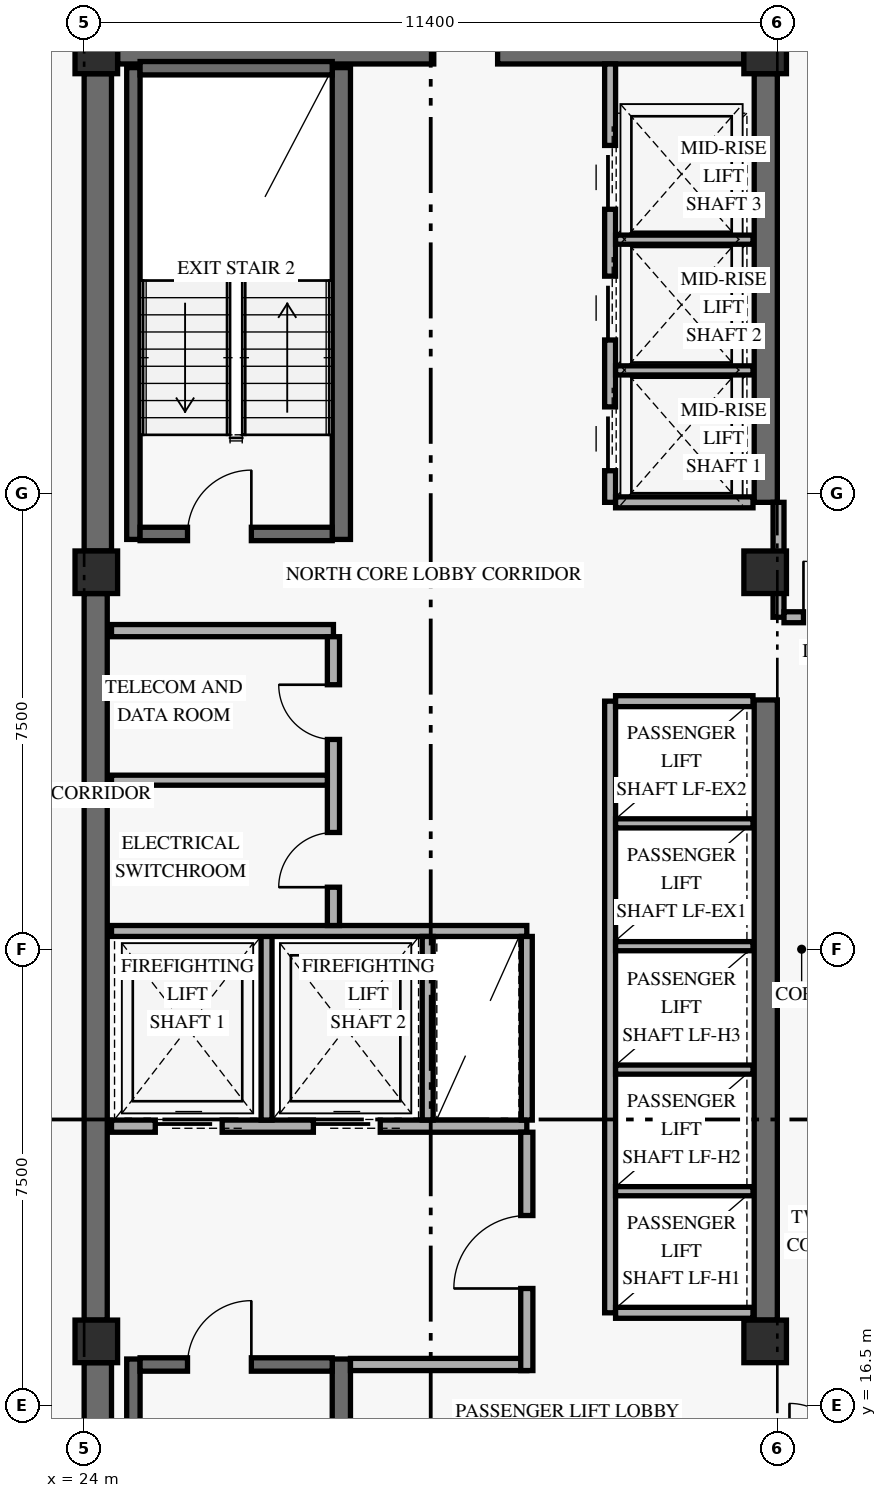
"""IFC4 building model, lengths in metres.
Left out: names, types, materials, properties, quantities, classifications, styles, units other than length and angle.
Written with IfcOpenShell. Run it as: python <this file> out.ifc"""

import sys

from ifc_helpers import new_model, si_unit, direction, frame, frame_2d, origin, origin_2d, place, context, subcontext, project, spatial, rectangle, extrude, element, fill, save


model = new_model("IFC4")
c1 = context("Model", 3, precision=1e-05, world=origin(), true_north=direction((0.0, 1.0)))
c2 = subcontext(c1, "Body", "Model", "MODEL_VIEW")
j1 = project(units=[si_unit("LENGTHUNIT", "METRE"), si_unit("PLANEANGLEUNIT", "RADIAN")], contexts=[c1])
p1 = place(None, origin())
s1 = spatial("IfcSite", under=j1, at=p1, CompositionType="ELEMENT")
p2 = place(p1, origin())
s2 = spatial("IfcBuilding", under=s1, at=p2, CompositionType="ELEMENT")
p3 = place(p2, frame((0.0, 0.0, 169.8)))
s3 = spatial("IfcBuildingStorey", under=s2, at=p3, CompositionType="ELEMENT", Elevation=169.8)
p4 = place(p3, frame((24.225, 9.6, 0.0), z_axis=(0.0, 0.0, 1.0), x_axis=(0.0, 1.0, 0.0)))
e1 = element("IfcWall", 1, at=p4, inside=s3, PredefinedType="SHEAR", context=c2, shape_type="SweptSolid", body=[
    extrude(rectangle(XDim=7.6, YDim=0.45, at=frame_2d((3.8, 0.0))), origin(), (0.0, 0.0, 1.0), 2.738),
])
p5 = place(p3, frame((24.19, 17.9, 0.0), z_axis=(0.0, 0.0, 1.0), x_axis=(0.0, 1.0, 0.0)))
e2 = element("IfcWall", 2, at=p5, inside=s3, PredefinedType="SHEAR", context=c2, shape_type="SweptSolid", body=[
    extrude(rectangle(XDim=11.95, YDim=0.38, at=frame_2d((5.975, 0.0))), origin(), (0.0, 0.0, 1.0), 2.738),
])
p6 = place(p3, frame((24.225, 30.55, 0.0), z_axis=(0.0, 0.0, 1.0), x_axis=(0.0, 1.0, 0.0)))
e3 = element("IfcWall", 3, at=p6, inside=s3, PredefinedType="SHEAR", context=c2, shape_type="SweptSolid", body=[
    extrude(rectangle(XDim=7.85, YDim=0.45, at=frame_2d((3.925, 0.0))), origin(), (0.0, 0.0, 1.0), 2.738),
])
p7 = place(p3, frame((35.21, 17.9, 0.0), z_axis=(0.0, 0.0, 1.0), x_axis=(0.0, 1.0, 0.0)))
e4 = element("IfcWall", 4, at=p7, inside=s3, PredefinedType="SHEAR", context=c2, shape_type="SweptSolid", body=[
    extrude(rectangle(XDim=10.2, YDim=0.38, at=frame_2d((5.1, 0.0))), origin(), (0.0, 0.0, 1.0), 2.738),
])
p8 = place(p3, frame((35.21, 31.35, 0.0), z_axis=(0.0, 0.0, 1.0), x_axis=(0.0, 1.0, 0.0)))
e5 = element("IfcWall", 5, at=p8, inside=s3, PredefinedType="SHEAR", context=c2, shape_type="SweptSolid", body=[
    extrude(rectangle(XDim=7.05, YDim=0.38, at=frame_2d((3.525, 0.0))), origin(), (0.0, 0.0, 1.0), 2.738),
])
p9 = place(p3, frame((24.55, 38.75, 0.0), z_axis=(0.0, 0.0, 1.0), x_axis=(1.0, 0.0, 0.0)))
e6 = element("IfcWall", 6, at=p9, inside=s3, PredefinedType="SHEAR", context=c2, shape_type="SweptSolid", body=[
    extrude(rectangle(XDim=10.3, YDim=0.38, at=frame_2d((5.15, 0.0))), origin(), (0.0, 0.0, 1.0), 3.35),
])
p10 = place(p9, frame((5.2, 0.0, 0.0)))
e7 = element("IfcOpeningElement", 7, at=p10, cuts=e6, PredefinedType="OPENING", context=c2, shape_type="SweptSolid", body=[
    extrude(rectangle(XDim=1.05, YDim=2.15, at=frame_2d((0.525, 1.075))), frame((0.0, 0.2, 0.0), z_axis=(0.0, -1.0, 0.0), x_axis=(1.0, 0.0, 0.0)), (0.0, 0.0, 1.0), 0.4),
])
p11 = place(p3, frame((24.81, 9.5, 0.0), z_axis=(0.0, 0.0, 1.0), x_axis=(0.0, 1.0, 0.0)))
e8 = element("IfcWall", 8, at=p11, inside=s3, PredefinedType="SHEAR", context=c2, shape_type="SweptSolid", body=[
    extrude(rectangle(XDim=7.76, YDim=0.22, at=frame_2d((3.88, 0.0))), origin(), (0.0, 0.0, 1.0), 3.35),
])
p12 = place(p3, frame((28.23, 9.5, 0.0), z_axis=(0.0, 0.0, 1.0), x_axis=(0.0, 1.0, 0.0)))
e9 = element("IfcWall", 9, at=p12, inside=s3, PredefinedType="SHEAR", context=c2, shape_type="SweptSolid", body=[
    extrude(rectangle(XDim=7.76, YDim=0.3, at=frame_2d((3.88, 0.0))), origin(), (0.0, 0.0, 1.0), 3.35),
])
p13 = place(p3, frame((24.92, 17.17, 0.0), z_axis=(0.0, 0.0, 1.0), x_axis=(1.0, 0.0, 0.0)))
e10 = element("IfcWall", 10, at=p13, inside=s3, PredefinedType="SHEAR", context=c2, shape_type="SweptSolid", body=[
    extrude(rectangle(XDim=3.16, YDim=0.22, at=frame_2d((1.58, 0.0))), origin(), (0.0, 0.0, 1.0), 3.35),
])
p14 = place(p13, frame((0.78, 0.0, 0.0)))
e11 = element("IfcOpeningElement", 11, at=p14, cuts=e10, PredefinedType="OPENING", context=c2, shape_type="SweptSolid", body=[
    extrude(rectangle(XDim=1.05, YDim=2.15, at=frame_2d((0.525, 1.075))), frame((0.0, 0.12, 0.0), z_axis=(0.0, -1.0, 0.0), x_axis=(1.0, 0.0, 0.0)), (0.0, 0.0, 1.0), 0.24),
])
p15 = place(p3, frame((24.81, 30.74, 0.0), z_axis=(0.0, 0.0, 1.0), x_axis=(0.0, 1.0, 0.0)))
e12 = element("IfcWall", 12, at=p15, inside=s3, PredefinedType="SHEAR", context=c2, shape_type="SweptSolid", body=[
    extrude(rectangle(XDim=7.76, YDim=0.22, at=frame_2d((3.88, 0.0))), origin(), (0.0, 0.0, 1.0), 3.35),
])
p16 = place(p3, frame((28.23, 30.74, 0.0), z_axis=(0.0, 0.0, 1.0), x_axis=(0.0, 1.0, 0.0)))
e13 = element("IfcWall", 13, at=p16, inside=s3, PredefinedType="SHEAR", context=c2, shape_type="SweptSolid", body=[
    extrude(rectangle(XDim=7.76, YDim=0.3, at=frame_2d((3.88, 0.0))), origin(), (0.0, 0.0, 1.0), 3.35),
])
p17 = place(p3, frame((24.92, 30.83, 0.0), z_axis=(0.0, 0.0, 1.0), x_axis=(1.0, 0.0, 0.0)))
e14 = element("IfcWall", 14, at=p17, inside=s3, PredefinedType="SHEAR", context=c2, shape_type="SweptSolid", body=[
    extrude(rectangle(XDim=3.16, YDim=0.22, at=frame_2d((1.58, 0.0))), origin(), (0.0, 0.0, 1.0), 3.35),
])
p18 = place(p17, frame((0.78, 0.0, 0.0)))
e15 = element("IfcOpeningElement", 15, at=p18, cuts=e14, PredefinedType="OPENING", context=c2, shape_type="SweptSolid", body=[
    extrude(rectangle(XDim=1.05, YDim=2.15, at=frame_2d((0.525, 1.075))), frame((0.0, 0.12, 0.0), z_axis=(0.0, -1.0, 0.0), x_axis=(1.0, 0.0, 0.0)), (0.0, 0.0, 1.0), 0.24),
])
p19 = place(p3, frame((24.92, 38.49, 0.0), z_axis=(0.0, 0.0, 1.0), x_axis=(1.0, 0.0, 0.0)))
e16 = element("IfcWall", 16, at=p19, inside=s3, PredefinedType="SHEAR", context=c2, shape_type="SweptSolid", body=[
    extrude(rectangle(XDim=3.16, YDim=0.22, at=frame_2d((1.58, 0.0))), origin(), (0.0, 0.0, 1.0), 3.35),
])
for number, where, z_axis, x_axis in (
    (17, (24.2, 17.55, 0.0), (0.0, 0.0, 1.0), (1.0, 0.0, 0.0)),
    (18, (24.2, 30.2, 0.0), (0.0, 0.0, 1.0), (1.0, 0.0, 0.0)),
    (19, (24.2, 38.75, 0.0), (0.0, 0.0, 1.0), (1.0, 0.0, 0.0)),
    (20, (35.2, 17.55, 0.0), (0.0, 0.0, 1.0), (1.0, 0.0, 0.0)),
    (21, (35.2, 30.2, 0.0), (0.0, 0.0, 1.0), (1.0, 0.0, 0.0)),
    (22, (35.2, 38.75, 0.0), (0.0, 0.0, 1.0), (1.0, 0.0, 0.0)),
):
    element("IfcColumn", number, at=place(p3, frame(where, z_axis=z_axis, x_axis=x_axis)), inside=s3, PredefinedType="COLUMN", context=c2, shape_type="SweptSolid", body=[
        extrude(rectangle(XDim=0.7, YDim=0.7, at=origin_2d()), origin(), (0.0, 0.0, 1.0), 3.6),
    ])
p20 = place(p3, frame((24.45, 21.09, 0.0), z_axis=(0.0, 0.0, 1.0), x_axis=(1.0, 0.0, 0.0)))
e23 = element("IfcWall", 23, at=p20, inside=s3, PredefinedType="STANDARD", context=c2, shape_type="SweptSolid", body=[
    extrude(rectangle(XDim=6.83, YDim=0.2, at=frame_2d((3.415, 0.0))), origin(), (0.0, 0.0, 1.0), 3.35),
])
p21 = place(p20, frame((0.72, 0.0, 0.0)))
e24 = element("IfcOpeningElement", 24, at=p21, cuts=e23, PredefinedType="OPENING", context=c2, shape_type="SweptSolid", body=[
    extrude(rectangle(XDim=1.1, YDim=2.2, at=frame_2d((0.55, 1.1))), frame((0.0, 0.11, 0.0), z_axis=(0.0, -1.0, 0.0), x_axis=(1.0, 0.0, 0.0)), (0.0, 0.0, 1.0), 0.22),
])
p22 = place(p20, frame((3.32, 0.0, 0.0)))
e25 = element("IfcOpeningElement", 25, at=p22, cuts=e23, PredefinedType="OPENING", context=c2, shape_type="SweptSolid", body=[
    extrude(rectangle(XDim=1.1, YDim=2.2, at=frame_2d((0.55, 1.1))), frame((0.0, 0.11, 0.0), z_axis=(0.0, -1.0, 0.0), x_axis=(1.0, 0.0, 0.0)), (0.0, 0.0, 1.0), 0.22),
])
p23 = place(p3, frame((28.38, 17.17, 0.0), z_axis=(0.0, 0.0, 1.0), x_axis=(1.0, 0.0, 0.0)))
e26 = element("IfcWall", 26, at=p23, inside=s3, PredefinedType="STANDARD", context=c2, shape_type="SweptSolid", body=[
    extrude(rectangle(XDim=2.9, YDim=0.2, at=frame_2d((1.45, 0.0))), origin(), (0.0, 0.0, 1.0), 3.35),
])
p24 = place(p3, frame((31.28, 17.07, 0.0), z_axis=(0.0, 0.0, 1.0), x_axis=(0.0, 1.0, 0.0)))
e27 = element("IfcWall", 27, at=p24, inside=s3, PredefinedType="STANDARD", context=c2, shape_type="SweptSolid", body=[
    extrude(rectangle(XDim=3.92, YDim=0.2, at=frame_2d((1.96, 0.0))), origin(), (0.0, 0.0, 1.0), 2.72),
])
p25 = place(p24, frame((1.35, 0.0, 0.0)))
e28 = element("IfcOpeningElement", 28, at=p25, cuts=e27, PredefinedType="OPENING", context=c2, shape_type="SweptSolid", body=[
    extrude(rectangle(XDim=1.2, YDim=2.15, at=frame_2d((0.6, 1.075))), frame((0.0, 0.11, 0.0), z_axis=(0.0, -1.0, 0.0), x_axis=(1.0, 0.0, 0.0)), (0.0, 0.0, 1.0), 0.22),
])
p26 = place(p3, frame((27.0, 21.19, 0.0), z_axis=(0.0, 0.0, 1.0), x_axis=(0.0, 1.0, 0.0)))
e29 = element("IfcWall", 29, at=p26, inside=s3, PredefinedType="STANDARD", context=c2, shape_type="SweptSolid", body=[
    extrude(rectangle(XDim=3.11, YDim=0.18, at=frame_2d((1.555, 0.0))), origin(), (0.0, 0.0, 1.0), 3.35),
])
p27 = place(p3, frame((24.45, 24.3, 0.0), z_axis=(0.0, 0.0, 1.0), x_axis=(1.0, 0.0, 0.0)))
e30 = element("IfcWall", 30, at=p27, inside=s3, PredefinedType="STANDARD", context=c2, shape_type="SweptSolid", body=[
    extrude(rectangle(XDim=6.83, YDim=0.18, at=frame_2d((3.415, 0.0))), origin(), (0.0, 0.0, 1.0), 3.35),
])
for number, where, z_axis, x_axis in (
    (31, (29.65, 21.19, 0.0), (0.0, 0.0, 1.0), (0.0, 1.0, 0.0)),
    (32, (31.28, 21.19, 0.0), (0.0, 0.0, 1.0), (0.0, 1.0, 0.0)),
):
    element("IfcWall", number, at=place(p3, frame(where, z_axis=z_axis, x_axis=x_axis)), inside=s3, PredefinedType="STANDARD", context=c2, shape_type="SweptSolid", body=[
        extrude(rectangle(XDim=3.02, YDim=0.18, at=frame_2d((1.51, 0.0))), origin(), (0.0, 0.0, 1.0), 3.35),
    ])
p28 = place(p3, frame((24.45, 29.24, 0.0), z_axis=(0.0, 0.0, 1.0), x_axis=(1.0, 0.0, 0.0)))
e33 = element("IfcWall", 33, at=p28, inside=s3, PredefinedType="STANDARD", context=c2, shape_type="SweptSolid", body=[
    extrude(rectangle(XDim=3.65, YDim=0.2, at=frame_2d((1.825, 0.0))), origin(), (0.0, 0.0, 1.0), 3.35),
])
p29 = place(p3, frame((28.1, 24.39, 0.0), z_axis=(0.0, 0.0, 1.0), x_axis=(0.0, 1.0, 0.0)))
e34 = element("IfcWall", 34, at=p29, inside=s3, PredefinedType="STANDARD", context=c2, shape_type="SweptSolid", body=[
    extrude(rectangle(XDim=4.75, YDim=0.2, at=frame_2d((2.375, 0.0))), origin(), (0.0, 0.0, 1.0), 3.35),
])
p30 = place(p29, frame((0.63, 0.0, 0.0)))
e35 = element("IfcOpeningElement", 35, at=p30, cuts=e34, PredefinedType="OPENING", context=c2, shape_type="SweptSolid", body=[
    extrude(rectangle(XDim=0.9, YDim=2.1, at=frame_2d((0.45, 1.05))), frame((0.0, 0.11, 0.0), z_axis=(0.0, -1.0, 0.0), x_axis=(1.0, 0.0, 0.0)), (0.0, 0.0, 1.0), 0.22),
])
p31 = place(p29, frame((3.06, 0.0, 0.0)))
e36 = element("IfcOpeningElement", 36, at=p31, cuts=e34, PredefinedType="OPENING", context=c2, shape_type="SweptSolid", body=[
    extrude(rectangle(XDim=0.9, YDim=2.1, at=frame_2d((0.45, 1.05))), frame((0.0, 0.11, 0.0), z_axis=(0.0, -1.0, 0.0), x_axis=(1.0, 0.0, 0.0)), (0.0, 0.0, 1.0), 0.22),
])
p32 = place(p3, frame((24.45, 26.78, 0.0), z_axis=(0.0, 0.0, 1.0), x_axis=(1.0, 0.0, 0.0)))
e37 = element("IfcWall", 37, at=p32, inside=s3, PredefinedType="PARTITIONING", context=c2, shape_type="SweptSolid", body=[
    extrude(rectangle(XDim=3.55, YDim=0.165, at=frame_2d((1.775, 0.0))), origin(), (0.0, 0.0, 1.0), 3.35),
])
p33 = place(p3, frame((32.65, 18.02, 0.0), z_axis=(0.0, 0.0, 1.0), x_axis=(0.0, 1.0, 0.0)))
e38 = element("IfcWall", 38, at=p33, inside=s3, PredefinedType="STANDARD", context=c2, shape_type="SweptSolid", body=[
    extrude(rectangle(XDim=10.06, YDim=0.18, at=frame_2d((5.03, 0.0))), origin(), (0.0, 0.0, 1.0), 3.35),
])
for number, where, z_axis, x_axis in (
    (39, (32.74, 18.02, 0.0), (0.0, 0.0, 1.0), (1.0, 0.0, 0.0)),
    (40, (32.74, 28.08, 0.0), (0.0, 0.0, 1.0), (1.0, 0.0, 0.0)),
):
    element("IfcWall", number, at=place(p3, frame(where, z_axis=z_axis, x_axis=x_axis)), inside=s3, PredefinedType="STANDARD", context=c2, shape_type="SweptSolid", body=[
        extrude(rectangle(XDim=2.26, YDim=0.18, at=frame_2d((1.13, 0.0))), origin(), (0.0, 0.0, 1.0), 3.35),
    ])
for number, where, z_axis, x_axis in (
    (41, (32.74, 20.02, 0.0), (0.0, 0.0, 1.0), (1.0, 0.0, 0.0)),
    (42, (32.74, 22.02, 0.0), (0.0, 0.0, 1.0), (1.0, 0.0, 0.0)),
    (43, (32.74, 24.05, 0.0), (0.0, 0.0, 1.0), (1.0, 0.0, 0.0)),
    (44, (32.74, 26.07, 0.0), (0.0, 0.0, 1.0), (1.0, 0.0, 0.0)),
):
    element("IfcWall", number, at=place(p3, frame(where, z_axis=z_axis, x_axis=x_axis)), inside=s3, PredefinedType="STANDARD", context=c2, shape_type="SweptSolid", body=[
        extrude(rectangle(XDim=2.26, YDim=0.15, at=frame_2d((1.13, 0.0))), origin(), (0.0, 0.0, 1.0), 3.35),
    ])
p34 = place(p3, frame((32.65, 31.35, 0.0), z_axis=(0.0, 0.0, 1.0), x_axis=(0.0, 1.0, 0.0)))
e45 = element("IfcWall", 45, at=p34, inside=s3, PredefinedType="STANDARD", context=c2, shape_type="SweptSolid", body=[
    extrude(rectangle(XDim=7.21, YDim=0.18, at=frame_2d((3.605, 0.0))), origin(), (0.0, 0.0, 1.0), 3.35),
])
p35 = place(p34, frame((0.52, 0.0, 0.0)))
e46 = element("IfcOpeningElement", 46, at=p35, cuts=e45, PredefinedType="OPENING", context=c2, shape_type="SweptSolid", body=[
    extrude(rectangle(XDim=1.05, YDim=2.2, at=frame_2d((0.525, 1.1))), frame((0.0, 0.1, 0.0), z_axis=(0.0, -1.0, 0.0), x_axis=(1.0, 0.0, 0.0)), (0.0, 0.0, 1.0), 0.2),
])
p36 = place(p34, frame((2.67, 0.0, 0.0)))
e47 = element("IfcOpeningElement", 47, at=p36, cuts=e45, PredefinedType="OPENING", context=c2, shape_type="SweptSolid", body=[
    extrude(rectangle(XDim=1.05, YDim=2.2, at=frame_2d((0.525, 1.1))), frame((0.0, 0.1, 0.0), z_axis=(0.0, -1.0, 0.0), x_axis=(1.0, 0.0, 0.0)), (0.0, 0.0, 1.0), 0.2),
])
p37 = place(p34, frame((4.82, 0.0, 0.0)))
e48 = element("IfcOpeningElement", 48, at=p37, cuts=e45, PredefinedType="OPENING", context=c2, shape_type="SweptSolid", body=[
    extrude(rectangle(XDim=1.05, YDim=2.2, at=frame_2d((0.525, 1.1))), frame((0.0, 0.1, 0.0), z_axis=(0.0, -1.0, 0.0), x_axis=(1.0, 0.0, 0.0)), (0.0, 0.0, 1.0), 0.2),
])
p38 = place(p3, frame((32.74, 31.35, 0.0), z_axis=(0.0, 0.0, 1.0), x_axis=(1.0, 0.0, 0.0)))
e49 = element("IfcWall", 49, at=p38, inside=s3, PredefinedType="STANDARD", context=c2, shape_type="SweptSolid", body=[
    extrude(rectangle(XDim=2.26, YDim=0.18, at=frame_2d((1.13, 0.0))), origin(), (0.0, 0.0, 1.0), 3.35),
])
for number, where, z_axis, x_axis in (
    (50, (32.74, 33.52, 0.0), (0.0, 0.0, 1.0), (1.0, 0.0, 0.0)),
    (51, (32.74, 35.67, 0.0), (0.0, 0.0, 1.0), (1.0, 0.0, 0.0)),
):
    element("IfcWall", number, at=place(p3, frame(where, z_axis=z_axis, x_axis=x_axis)), inside=s3, PredefinedType="STANDARD", context=c2, shape_type="SweptSolid", body=[
        extrude(rectangle(XDim=2.26, YDim=0.15, at=frame_2d((1.13, 0.0))), origin(), (0.0, 0.0, 1.0), 3.35),
    ])
p39 = place(p3, frame((35.42, 29.46, 0.0), z_axis=(0.0, 0.0, 1.0), x_axis=(0.0, 1.0, 0.0)))
e52 = element("IfcWall", 52, at=p39, inside=s3, PredefinedType="STANDARD", context=c2, shape_type="SweptSolid", body=[
    extrude(rectangle(XDim=1.89, YDim=0.18, at=frame_2d((0.945, 0.0))), origin(), (0.0, 0.0, 1.0), 2.72),
])
p40 = place(p3, frame((35.51, 29.46, 0.0), z_axis=(0.0, 0.0, 1.0), x_axis=(1.0, 0.0, 0.0)))
e53 = element("IfcWall", 53, at=p40, inside=s3, PredefinedType="STANDARD", context=c2, shape_type="SweptSolid", body=[
    extrude(rectangle(XDim=13.29, YDim=0.18, at=frame_2d((6.645, 0.0))), origin(), (0.0, 0.0, 1.0), 2.72),
])
p41 = place(p40, frame((0.32, 0.0, 0.0)))
e54 = element("IfcOpeningElement", 54, at=p41, cuts=e53, PredefinedType="OPENING", context=c2, shape_type="SweptSolid", body=[
    extrude(rectangle(XDim=0.92, YDim=2.15, at=frame_2d((0.46, 1.075))), frame((0.0, 0.1, 0.0), z_axis=(0.0, -1.0, 0.0), x_axis=(1.0, 0.0, 0.0)), (0.0, 0.0, 1.0), 0.2),
])
p42 = place(p3, frame((35.42, 38.75, 0.0), z_axis=(0.0, 0.0, 1.0), x_axis=(0.0, 1.0, 0.0)))
e55 = element("IfcWall", 55, at=p42, inside=s3, PredefinedType="PARTITIONING", context=c2, shape_type="SweptSolid", body=[
    extrude(rectangle(XDim=4.97, YDim=0.18, at=frame_2d((2.485, 0.0))), origin(), (0.0, 0.0, 1.0), 2.72),
])
p43 = place(p14, frame((1.05, 0.0, 0.0), z_axis=(0.0, 0.0, 1.0), x_axis=(-1.0, 0.0, 0.0)))
e56 = element("IfcDoor", 56, at=p43, inside=s3, OperationType="SINGLE_SWING_LEFT", PredefinedType="DOOR", context=c2, shape_type="SweptSolid", body=[
    extrude(rectangle(XDim=1.05, YDim=2.15, at=frame_2d((0.525, 1.075))), frame((0.0, 0.025, 0.0), z_axis=(0.0, -1.0, 0.0), x_axis=(1.0, 0.0, 0.0)), (0.0, 0.0, 1.0), 0.05),
])
fill(e11, e56)
p44 = place(p18, origin())
e57 = element("IfcDoor", 57, at=p44, inside=s3, OperationType="SINGLE_SWING_RIGHT", PredefinedType="DOOR", context=c2, shape_type="SweptSolid", body=[
    extrude(rectangle(XDim=1.05, YDim=2.15, at=frame_2d((0.525, 1.075))), frame((0.0, 0.025, 0.0), z_axis=(0.0, -1.0, 0.0), x_axis=(1.0, 0.0, 0.0)), (0.0, 0.0, 1.0), 0.05),
])
fill(e15, e57)
p45 = place(p21, origin())
e58 = element("IfcDoor", 58, at=p45, inside=s3, OperationType="SLIDING_TO_LEFT", PredefinedType="DOOR", context=c2, shape_type="SweptSolid", body=[
    extrude(rectangle(XDim=1.1, YDim=2.2, at=frame_2d((0.55, 1.1))), frame((0.0, 0.025, 0.0), z_axis=(0.0, -1.0, 0.0), x_axis=(1.0, 0.0, 0.0)), (0.0, 0.0, 1.0), 0.05),
])
fill(e24, e58)
p46 = place(p22, origin())
e59 = element("IfcDoor", 59, at=p46, inside=s3, OperationType="SLIDING_TO_LEFT", PredefinedType="DOOR", context=c2, shape_type="SweptSolid", body=[
    extrude(rectangle(XDim=1.1, YDim=2.2, at=frame_2d((0.55, 1.1))), frame((0.0, 0.025, 0.0), z_axis=(0.0, -1.0, 0.0), x_axis=(1.0, 0.0, 0.0)), (0.0, 0.0, 1.0), 0.05),
])
fill(e25, e59)
p47 = place(p25, origin())
e60 = element("IfcDoor", 60, at=p47, inside=s3, OperationType="SINGLE_SWING_LEFT", PredefinedType="DOOR", context=c2, shape_type="SweptSolid", body=[
    extrude(rectangle(XDim=1.2, YDim=2.15, at=frame_2d((0.6, 1.075))), frame((0.0, 0.025, 0.0), z_axis=(0.0, -1.0, 0.0), x_axis=(1.0, 0.0, 0.0)), (0.0, 0.0, 1.0), 0.05),
])
fill(e28, e60)
p48 = place(p30, origin())
e61 = element("IfcDoor", 61, at=p48, inside=s3, OperationType="SINGLE_SWING_LEFT", PredefinedType="DOOR", context=c2, shape_type="SweptSolid", body=[
    extrude(rectangle(XDim=0.9, YDim=2.1, at=frame_2d((0.45, 1.05))), frame((0.0, 0.025, 0.0), z_axis=(0.0, -1.0, 0.0), x_axis=(1.0, 0.0, 0.0)), (0.0, 0.0, 1.0), 0.05),
])
fill(e35, e61)
p49 = place(p31, origin())
e62 = element("IfcDoor", 62, at=p49, inside=s3, OperationType="SINGLE_SWING_RIGHT", PredefinedType="DOOR", context=c2, shape_type="SweptSolid", body=[
    extrude(rectangle(XDim=0.9, YDim=2.1, at=frame_2d((0.45, 1.05))), frame((0.0, 0.025, 0.0), z_axis=(0.0, -1.0, 0.0), x_axis=(1.0, 0.0, 0.0)), (0.0, 0.0, 1.0), 0.05),
])
fill(e36, e62)
p50 = place(p35, origin())
e63 = element("IfcDoor", 63, at=p50, inside=s3, OperationType="SLIDING_TO_LEFT", PredefinedType="DOOR", context=c2, shape_type="SweptSolid", body=[
    extrude(rectangle(XDim=1.05, YDim=2.2, at=frame_2d((0.525, 1.1))), frame((0.0, 0.025, 0.0), z_axis=(0.0, -1.0, 0.0), x_axis=(1.0, 0.0, 0.0)), (0.0, 0.0, 1.0), 0.05),
])
fill(e46, e63)
p51 = place(p36, origin())
e64 = element("IfcDoor", 64, at=p51, inside=s3, OperationType="SLIDING_TO_LEFT", PredefinedType="DOOR", context=c2, shape_type="SweptSolid", body=[
    extrude(rectangle(XDim=1.05, YDim=2.2, at=frame_2d((0.525, 1.1))), frame((0.0, 0.025, 0.0), z_axis=(0.0, -1.0, 0.0), x_axis=(1.0, 0.0, 0.0)), (0.0, 0.0, 1.0), 0.05),
])
fill(e47, e64)
p52 = place(p37, origin())
e65 = element("IfcDoor", 65, at=p52, inside=s3, OperationType="SLIDING_TO_LEFT", PredefinedType="DOOR", context=c2, shape_type="SweptSolid", body=[
    extrude(rectangle(XDim=1.05, YDim=2.2, at=frame_2d((0.525, 1.1))), frame((0.0, 0.025, 0.0), z_axis=(0.0, -1.0, 0.0), x_axis=(1.0, 0.0, 0.0)), (0.0, 0.0, 1.0), 0.05),
])
fill(e48, e65)
p53 = place(p10, frame((1.05, 0.0, 0.0), z_axis=(0.0, 0.0, 1.0), x_axis=(-1.0, 0.0, 0.0)))
e66 = element("IfcDoor", 66, at=p53, inside=s3, OperationType="SINGLE_SWING_RIGHT", PredefinedType="DOOR", context=c2, shape_type="SweptSolid", body=[
    extrude(rectangle(XDim=1.05, YDim=2.15, at=frame_2d((0.525, 1.075))), frame((0.0, 0.025, 0.0), z_axis=(0.0, -1.0, 0.0), x_axis=(1.0, 0.0, 0.0)), (0.0, 0.0, 1.0), 0.05),
])
fill(e7, e66)
p54 = place(p41, origin())
e67 = element("IfcDoor", 67, at=p54, inside=s3, OperationType="SINGLE_SWING_LEFT", PredefinedType="DOOR", context=c2, shape_type="SweptSolid", body=[
    extrude(rectangle(XDim=0.92, YDim=2.15, at=frame_2d((0.46, 1.075))), frame((0.0, 0.025, 0.0), z_axis=(0.0, -1.0, 0.0), x_axis=(1.0, 0.0, 0.0)), (0.0, 0.0, 1.0), 0.05),
])
fill(e54, e67)
save(model, sys.argv[1])
